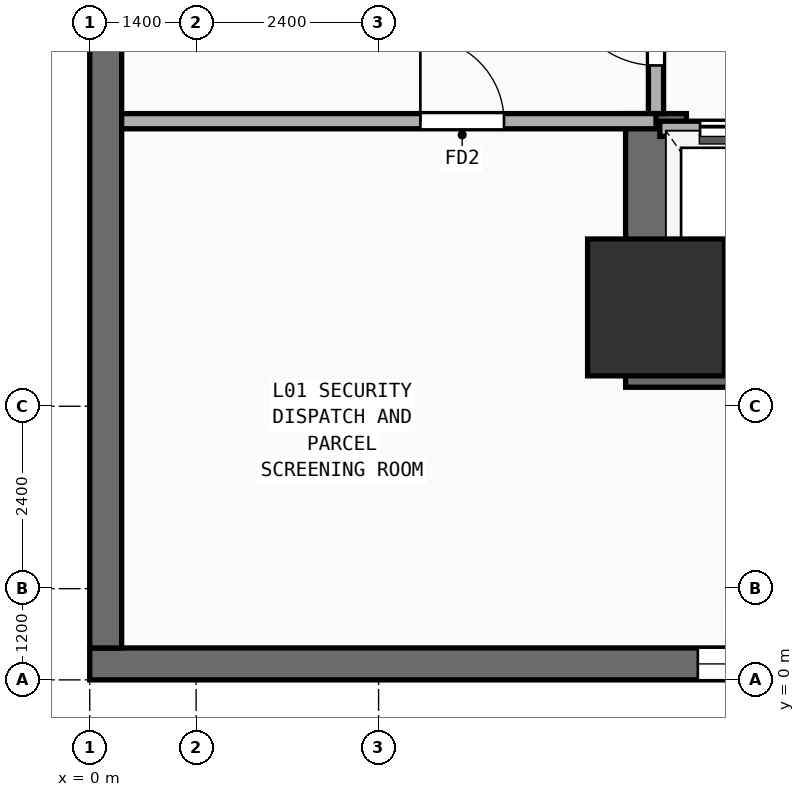
"""IFC4 building model, lengths in metres.
Left out: names, types, materials, properties, quantities, classifications, styles, units other than length and angle.
Written with IfcOpenShell. Run it as: python <this file> out.ifc"""

import sys

from ifc_helpers import new_model, si_unit, direction, frame, frame_2d, origin, origin_2d, place, context, subcontext, project, spatial, rectangle, extrude, element, fill, save


model = new_model("IFC4")
c1 = context("Model", 3, precision=1e-05, world=origin(), true_north=direction((0.0, 1.0)))
c2 = subcontext(c1, "Body", "Model", "MODEL_VIEW")
j1 = project(units=[si_unit("LENGTHUNIT", "METRE"), si_unit("PLANEANGLEUNIT", "RADIAN")], contexts=[c1])
p1 = place(None, origin())
s1 = spatial("IfcSite", under=j1, at=p1, CompositionType="ELEMENT")
p2 = place(p1, origin())
s2 = spatial("IfcBuilding", under=s1, at=p2, CompositionType="ELEMENT")
p3 = place(p2, origin())
s3 = spatial("IfcBuildingStorey", under=s2, at=p3, CompositionType="ELEMENT", Elevation=0.0)
p4 = place(p3, frame((7.05, 4.25, 0.0), z_axis=(0.0, 0.0, 1.0), x_axis=(1.0, 0.0, 0.0)))
e1 = element("IfcWall", 1, at=p4, inside=s3, PredefinedType="SHEAR", context=c2, shape_type="SweptSolid", body=[
    extrude(rectangle(XDim=14.15, YDim=0.8, at=frame_2d((7.075, 0.0))), origin(), (0.0, 0.0, 1.0), 5.26),
])
p5 = place(p3, frame((7.45, 4.65, 0.0), z_axis=(0.0, 0.0, 1.0), x_axis=(0.0, 1.0, 0.0)))
e2 = element("IfcWall", 2, at=p5, inside=s3, PredefinedType="SHEAR", context=c2, shape_type="SweptSolid", body=[
    extrude(rectangle(XDim=2.8, YDim=0.8, at=frame_2d((1.4, 0.0))), origin(), (0.0, 0.0, 1.0), 5.26),
])
p6 = place(p3, frame((7.45, 4.9, 0.0), z_axis=(0.0, 0.0, 1.0), x_axis=(1.0, 0.0, 0.0)))
e3 = element("IfcColumn", 3, at=p6, inside=s3, PredefinedType="COLUMN", context=c2, shape_type="SweptSolid", body=[
    extrude(rectangle(XDim=1.8, YDim=1.8, at=origin_2d()), origin(), (0.0, 0.0, 1.0), 5.26),
])
p7 = place(p3, frame((0.0, 0.21, 0.0), z_axis=(0.0, 0.0, 1.0), x_axis=(1.0, 0.0, 0.0)))
e4 = element("IfcWall", 4, at=p7, inside=s3, PredefinedType="SOLIDWALL", context=c2, shape_type="SweptSolid", body=[
    extrude(rectangle(XDim=64.8, YDim=0.42, at=frame_2d((32.4, 0.0))), origin(), (0.0, 0.0, 1.0), 5.26),
])
p8 = place(p7, frame((8.0, 0.0, 0.95)))
e5 = element("IfcOpeningElement", 5, at=p8, cuts=e4, PredefinedType="OPENING", context=c2, shape_type="SweptSolid", body=[
    extrude(rectangle(XDim=1.2, YDim=1.6, at=frame_2d((0.6, 0.8))), frame((0.0, 0.22, 0.0), z_axis=(0.0, -1.0, 0.0), x_axis=(1.0, 0.0, 0.0)), (0.0, 0.0, 1.0), 0.44),
])
p9 = place(p7, frame((16.0, 0.0, 0.95)))
e6 = element("IfcOpeningElement", 6, at=p9, cuts=e4, PredefinedType="OPENING", context=c2, shape_type="SweptSolid", body=[
    extrude(rectangle(XDim=1.2, YDim=1.6, at=frame_2d((0.6, 0.8))), frame((0.0, 0.22, 0.0), z_axis=(0.0, -1.0, 0.0), x_axis=(1.0, 0.0, 0.0)), (0.0, 0.0, 1.0), 0.44),
])
p10 = place(p7, frame((34.0, 0.0, 0.95)))
e7 = element("IfcOpeningElement", 7, at=p10, cuts=e4, PredefinedType="OPENING", context=c2, shape_type="SweptSolid", body=[
    extrude(rectangle(XDim=1.2, YDim=1.6, at=frame_2d((0.6, 0.8))), frame((0.0, 0.22, 0.0), z_axis=(0.0, -1.0, 0.0), x_axis=(1.0, 0.0, 0.0)), (0.0, 0.0, 1.0), 0.44),
])
p11 = place(p7, frame((58.0, 0.0, 0.95)))
e8 = element("IfcOpeningElement", 8, at=p11, cuts=e4, PredefinedType="OPENING", context=c2, shape_type="SweptSolid", body=[
    extrude(rectangle(XDim=1.2, YDim=1.6, at=frame_2d((0.6, 0.8))), frame((0.0, 0.22, 0.0), z_axis=(0.0, -1.0, 0.0), x_axis=(1.0, 0.0, 0.0)), (0.0, 0.0, 1.0), 0.44),
])
p12 = place(p7, frame((24.2, 0.0, 0.0)))
e9 = element("IfcOpeningElement", 9, at=p12, cuts=e4, PredefinedType="OPENING", context=c2, shape_type="SweptSolid", body=[
    extrude(rectangle(XDim=2.0, YDim=2.5, at=frame_2d((1.0, 1.25))), frame((0.0, 0.22, 0.0), z_axis=(0.0, -1.0, 0.0), x_axis=(1.0, 0.0, 0.0)), (0.0, 0.0, 1.0), 0.44),
])
p13 = place(p7, frame((45.6, 0.0, 0.0)))
e10 = element("IfcOpeningElement", 10, at=p13, cuts=e4, PredefinedType="OPENING", context=c2, shape_type="SweptSolid", body=[
    extrude(rectangle(XDim=2.4, YDim=2.7, at=frame_2d((1.2, 1.35))), frame((0.0, 0.22, 0.0), z_axis=(0.0, -1.0, 0.0), x_axis=(1.0, 0.0, 0.0)), (0.0, 0.0, 1.0), 0.44),
])
p14 = place(p3, frame((0.21, 0.42, 0.0), z_axis=(0.0, 0.0, 1.0), x_axis=(0.0, 1.0, 0.0)))
e11 = element("IfcWall", 11, at=p14, inside=s3, PredefinedType="SOLIDWALL", context=c2, shape_type="SweptSolid", body=[
    extrude(rectangle(XDim=50.78, YDim=0.42, at=frame_2d((25.39, 0.0))), origin(), (0.0, 0.0, 1.0), 5.26),
])
p15 = place(p14, frame((18.0, 0.0, 0.95)))
e12 = element("IfcOpeningElement", 12, at=p15, cuts=e11, PredefinedType="OPENING", context=c2, shape_type="SweptSolid", body=[
    extrude(rectangle(XDim=1.2, YDim=1.6, at=frame_2d((0.6, 0.8))), frame((0.0, 0.22, 0.0), z_axis=(0.0, -1.0, 0.0), x_axis=(1.0, 0.0, 0.0)), (0.0, 0.0, 1.0), 0.44),
])
p16 = place(p14, frame((27.5, 0.0, 0.95)))
e13 = element("IfcOpeningElement", 13, at=p16, cuts=e11, PredefinedType="OPENING", context=c2, shape_type="SweptSolid", body=[
    extrude(rectangle(XDim=1.2, YDim=1.6, at=frame_2d((0.6, 0.8))), frame((0.0, 0.22, 0.0), z_axis=(0.0, -1.0, 0.0), x_axis=(1.0, 0.0, 0.0)), (0.0, 0.0, 1.0), 0.44),
])
p17 = place(p14, frame((8.0, 0.0, 0.0)))
e14 = element("IfcOpeningElement", 14, at=p17, cuts=e11, PredefinedType="OPENING", context=c2, shape_type="SweptSolid", body=[
    extrude(rectangle(XDim=2.0, YDim=2.5, at=frame_2d((1.0, 1.25))), frame((0.0, 0.22, 0.0), z_axis=(0.0, -1.0, 0.0), x_axis=(1.0, 0.0, 0.0)), (0.0, 0.0, 1.0), 0.44),
])
p18 = place(p14, frame((43.8, 0.0, 0.0)))
e15 = element("IfcOpeningElement", 15, at=p18, cuts=e11, PredefinedType="OPENING", context=c2, shape_type="SweptSolid", body=[
    extrude(rectangle(XDim=3.0, YDim=2.8, at=frame_2d((1.5, 1.4))), frame((0.0, 0.22, 0.0), z_axis=(0.0, -1.0, 0.0), x_axis=(1.0, 0.0, 0.0)), (0.0, 0.0, 1.0), 0.44),
])
p19 = place(p3, frame((7.5, 7.25, 0.0), z_axis=(0.0, 0.0, 1.0), x_axis=(1.0, 0.0, 0.0)))
e16 = element("IfcWall", 16, at=p19, inside=s3, PredefinedType="PARTITIONING", context=c2, shape_type="SweptSolid", body=[
    extrude(rectangle(XDim=8.35, YDim=0.2, at=frame_2d((4.175, 0.0))), origin(), (0.0, 0.0, 1.0), 5.26),
])
p20 = place(p19, frame((0.53, 0.0, 0.0)))
e17 = element("IfcOpeningElement", 17, at=p20, cuts=e16, PredefinedType="OPENING", context=c2, shape_type="SweptSolid", body=[
    extrude(rectangle(XDim=1.1, YDim=2.2, at=frame_2d((0.55, 1.1))), frame((0.0, 0.11, 0.0), z_axis=(0.0, -1.0, 0.0), x_axis=(1.0, 0.0, 0.0)), (0.0, 0.0, 1.0), 0.22),
])
p21 = place(p19, frame((2.37, 0.0, 0.0)))
e18 = element("IfcOpeningElement", 18, at=p21, cuts=e16, PredefinedType="OPENING", context=c2, shape_type="SweptSolid", body=[
    extrude(rectangle(XDim=1.1, YDim=2.2, at=frame_2d((0.55, 1.1))), frame((0.0, 0.11, 0.0), z_axis=(0.0, -1.0, 0.0), x_axis=(1.0, 0.0, 0.0)), (0.0, 0.0, 1.0), 0.22),
])
p22 = place(p19, frame((4.33, 0.0, 0.0)))
e19 = element("IfcOpeningElement", 19, at=p22, cuts=e16, PredefinedType="OPENING", context=c2, shape_type="SweptSolid", body=[
    extrude(rectangle(XDim=1.1, YDim=2.2, at=frame_2d((0.55, 1.1))), frame((0.0, 0.11, 0.0), z_axis=(0.0, -1.0, 0.0), x_axis=(1.0, 0.0, 0.0)), (0.0, 0.0, 1.0), 0.22),
])
p23 = place(p19, frame((6.5, 0.0, 0.0)))
e20 = element("IfcOpeningElement", 20, at=p23, cuts=e16, PredefinedType="OPENING", context=c2, shape_type="SweptSolid", body=[
    extrude(rectangle(XDim=1.1, YDim=2.2, at=frame_2d((0.55, 1.1))), frame((0.0, 0.11, 0.0), z_axis=(0.0, -1.0, 0.0), x_axis=(1.0, 0.0, 0.0)), (0.0, 0.0, 1.0), 0.22),
])
p24 = place(p3, frame((7.45, 7.45, 0.0), z_axis=(0.0, 0.0, 1.0), x_axis=(0.0, 1.0, 0.0)))
e21 = element("IfcWall", 21, at=p24, inside=s3, PredefinedType="PARTITIONING", context=c2, shape_type="SweptSolid", body=[
    extrude(rectangle(XDim=2.3, YDim=0.2, at=frame_2d((1.15, 0.0))), origin(), (0.0, 0.0, 1.0), 4.04),
])
p25 = place(p24, frame((0.633, 0.0, 0.0)))
e22 = element("IfcOpeningElement", 22, at=p25, cuts=e21, PredefinedType="OPENING", context=c2, shape_type="SweptSolid", body=[
    extrude(rectangle(XDim=1.2, YDim=2.25, at=frame_2d((0.6, 1.125))), frame((0.0, 0.11, 0.0), z_axis=(0.0, -1.0, 0.0), x_axis=(1.0, 0.0, 0.0)), (0.0, 0.0, 1.0), 0.22),
])
p26 = place(p3, frame((0.42, 7.35, 0.0), z_axis=(0.0, 0.0, 1.0), x_axis=(1.0, 0.0, 0.0)))
e23 = element("IfcWall", 23, at=p26, inside=s3, PredefinedType="PARTITIONING", context=c2, shape_type="SweptSolid", body=[
    extrude(rectangle(XDim=7.03, YDim=0.2, at=frame_2d((3.515, 0.0))), origin(), (0.0, 0.0, 1.0), 5.26),
])
p27 = place(p26, frame((3.93, 0.0, 0.0)))
e24 = element("IfcOpeningElement", 24, at=p27, cuts=e23, PredefinedType="OPENING", context=c2, shape_type="SweptSolid", body=[
    extrude(rectangle(XDim=1.1, YDim=2.2, at=frame_2d((0.55, 1.1))), frame((0.0, 0.11, 0.0), z_axis=(0.0, -1.0, 0.0), x_axis=(1.0, 0.0, 0.0)), (0.0, 0.0, 1.0), 0.22),
])
p28 = place(p8, origin())
e25 = element("IfcWindow", 25, at=p28, inside=s3, PartitioningType="SINGLE_PANEL", PredefinedType="WINDOW", context=c2, shape_type="SweptSolid", body=[
    extrude(rectangle(XDim=1.2, YDim=1.6, at=frame_2d((0.6, 0.8))), frame((0.0, 0.03, 0.0), z_axis=(0.0, -1.0, 0.0), x_axis=(1.0, 0.0, 0.0)), (0.0, 0.0, 1.0), 0.06),
])
fill(e5, e25)
p29 = place(p20, origin())
e26 = element("IfcDoor", 26, at=p29, inside=s3, OperationType="SLIDING_TO_LEFT", PredefinedType="DOOR", context=c2, shape_type="SweptSolid", body=[
    extrude(rectangle(XDim=1.1, YDim=2.2, at=frame_2d((0.55, 1.1))), frame((0.0, 0.025, 0.0), z_axis=(0.0, -1.0, 0.0), x_axis=(1.0, 0.0, 0.0)), (0.0, 0.0, 1.0), 0.05),
])
fill(e17, e26)
p30 = place(p25, frame((1.2, 0.0, 0.0), z_axis=(0.0, 0.0, 1.0), x_axis=(-1.0, 0.0, 0.0)))
e27 = element("IfcDoor", 27, at=p30, inside=s3, OperationType="SINGLE_SWING_LEFT", PredefinedType="DOOR", context=c2, shape_type="SweptSolid", body=[
    extrude(rectangle(XDim=1.2, YDim=2.25, at=frame_2d((0.6, 1.125))), frame((0.0, 0.025, 0.0), z_axis=(0.0, -1.0, 0.0), x_axis=(1.0, 0.0, 0.0)), (0.0, 0.0, 1.0), 0.05),
])
fill(e22, e27)
p31 = place(p27, origin())
e28 = element("IfcDoor", 28, at=p31, inside=s3, OperationType="SINGLE_SWING_LEFT", PredefinedType="DOOR", context=c2, shape_type="SweptSolid", body=[
    extrude(rectangle(XDim=1.1, YDim=2.2, at=frame_2d((0.55, 1.1))), frame((0.0, 0.025, 0.0), z_axis=(0.0, -1.0, 0.0), x_axis=(1.0, 0.0, 0.0)), (0.0, 0.0, 1.0), 0.05),
])
fill(e24, e28)
save(model, sys.argv[1])
